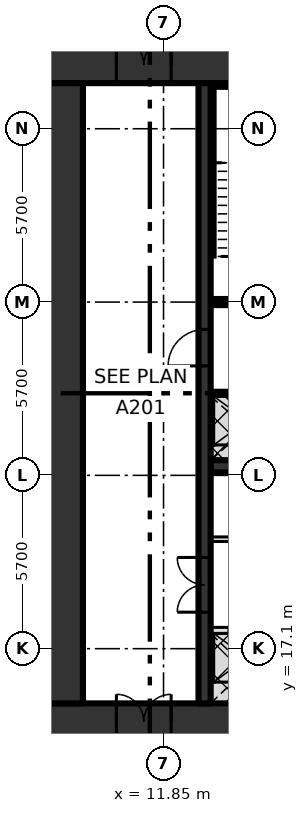
"""IFC4 building model, lengths in metres.
Left out: names, types, materials, properties, quantities, classifications, styles, units other than length and angle.
Written with IfcOpenShell. Run it as: python <this file> out.ifc"""

import sys

from ifc_helpers import new_model, si_unit, direction, frame, frame_2d, origin, place, context, subcontext, project, spatial, rectangle, extrude, element, fill, save


model = new_model("IFC4")
c1 = context("Model", 3, precision=1e-05, world=origin(), true_north=direction((0.0, 1.0)))
c2 = subcontext(c1, "Body", "Model", "MODEL_VIEW")
j1 = project(units=[si_unit("LENGTHUNIT", "METRE"), si_unit("PLANEANGLEUNIT", "RADIAN")], contexts=[c1])
p1 = place(None, origin())
s1 = spatial("IfcSite", under=j1, at=p1, CompositionType="ELEMENT")
p2 = place(p1, origin())
s2 = spatial("IfcBuilding", under=s1, at=p2, CompositionType="ELEMENT")
p3 = place(p2, frame((0.0, 0.0, -9.0)))
s3 = spatial("IfcBuildingStorey", under=s2, at=p3, CompositionType="ELEMENT", Elevation=-9.0)
p4 = place(p3, frame((8.0, 14.7, 0.0), z_axis=(0.0, 0.0, 1.0), x_axis=(1.0, 0.0, 0.0)))
e1 = element("IfcWall", 1, at=p4, inside=s3, PredefinedType="SHEAR", context=c2, shape_type="SweptSolid", body=[
    extrude(rectangle(XDim=22.8, YDim=1.2, at=frame_2d((11.4, 0.0))), origin(), (0.0, 0.0, 1.0), 4.05),
])
p5 = place(p4, frame((2.3, 0.0, 0.0)))
e2 = element("IfcOpeningElement", 2, at=p5, cuts=e1, PredefinedType="OPENING", context=c2, shape_type="SweptSolid", body=[
    extrude(rectangle(XDim=1.8, YDim=2.1, at=frame_2d((0.9, 1.05))), frame((0.0, 0.61, 0.0), z_axis=(0.0, -1.0, 0.0), x_axis=(1.0, 0.0, 0.0)), (0.0, 0.0, 1.0), 1.22),
])
p6 = place(p3, frame((8.0, 36.3, 0.0), z_axis=(0.0, 0.0, 1.0), x_axis=(1.0, 0.0, 0.0)))
e3 = element("IfcWall", 3, at=p6, inside=s3, PredefinedType="SHEAR", context=c2, shape_type="SweptSolid", body=[
    extrude(rectangle(XDim=22.8, YDim=1.2, at=frame_2d((11.4, 0.0))), origin(), (0.0, 0.0, 1.0), 4.05),
])
p7 = place(p6, frame((2.3, 0.0, 0.0)))
e4 = element("IfcOpeningElement", 4, at=p7, cuts=e3, PredefinedType="OPENING", context=c2, shape_type="SweptSolid", body=[
    extrude(rectangle(XDim=1.8, YDim=2.1, at=frame_2d((0.9, 1.05))), frame((0.0, 0.61, 0.0), z_axis=(0.0, -1.0, 0.0), x_axis=(1.0, 0.0, 0.0)), (0.0, 0.0, 1.0), 1.22),
])
p8 = place(p3, frame((8.6, 15.3, 0.0), z_axis=(0.0, 0.0, 1.0), x_axis=(0.0, 1.0, 0.0)))
e5 = element("IfcWall", 5, at=p8, inside=s3, PredefinedType="SHEAR", context=c2, shape_type="SweptSolid", body=[
    extrude(rectangle(XDim=20.4, YDim=1.2, at=frame_2d((10.2, 0.0))), origin(), (0.0, 0.0, 1.0), 4.05),
])
p9 = place(p3, frame((13.4, 17.7, 0.0), z_axis=(0.0, 0.0, 1.0), x_axis=(1.0, 0.0, 0.0)))
e6 = element("IfcWall", 6, at=p9, inside=s3, PredefinedType="SOLIDWALL", context=c2, shape_type="SweptSolid", body=[
    extrude(rectangle(XDim=13.4, YDim=0.2, at=frame_2d((6.7, 0.0))), origin(), (0.0, 0.0, 1.0), 4.05),
])
p10 = place(p9, frame((0.6, 0.0, 0.0)))
e7 = element("IfcOpeningElement", 7, at=p10, cuts=e6, PredefinedType="OPENING", context=c2, shape_type="SweptSolid", body=[
    extrude(rectangle(XDim=1.1, YDim=2.1, at=frame_2d((0.55, 1.05))), frame((0.0, 0.11, 0.0), z_axis=(0.0, -1.0, 0.0), x_axis=(1.0, 0.0, 0.0)), (0.0, 0.0, 1.0), 0.22),
])
p11 = place(p9, frame((3.3, 0.0, 0.0)))
e8 = element("IfcOpeningElement", 8, at=p11, cuts=e6, PredefinedType="OPENING", context=c2, shape_type="SweptSolid", body=[
    extrude(rectangle(XDim=1.1, YDim=2.1, at=frame_2d((0.55, 1.05))), frame((0.0, 0.11, 0.0), z_axis=(0.0, -1.0, 0.0), x_axis=(1.0, 0.0, 0.0)), (0.0, 0.0, 1.0), 0.22),
])
p12 = place(p9, frame((6.0, 0.0, 0.0)))
e9 = element("IfcOpeningElement", 9, at=p12, cuts=e6, PredefinedType="OPENING", context=c2, shape_type="SweptSolid", body=[
    extrude(rectangle(XDim=1.1, YDim=2.1, at=frame_2d((0.55, 1.05))), frame((0.0, 0.11, 0.0), z_axis=(0.0, -1.0, 0.0), x_axis=(1.0, 0.0, 0.0)), (0.0, 0.0, 1.0), 0.22),
])
p13 = place(p9, frame((8.7, 0.0, 0.0)))
e10 = element("IfcOpeningElement", 10, at=p13, cuts=e6, PredefinedType="OPENING", context=c2, shape_type="SweptSolid", body=[
    extrude(rectangle(XDim=1.1, YDim=2.1, at=frame_2d((0.55, 1.05))), frame((0.0, 0.11, 0.0), z_axis=(0.0, -1.0, 0.0), x_axis=(1.0, 0.0, 0.0)), (0.0, 0.0, 1.0), 0.22),
])
p14 = place(p9, frame((11.4, 0.0, 0.0)))
e11 = element("IfcOpeningElement", 11, at=p14, cuts=e6, PredefinedType="OPENING", context=c2, shape_type="SweptSolid", body=[
    extrude(rectangle(XDim=1.1, YDim=2.1, at=frame_2d((0.55, 1.05))), frame((0.0, 0.11, 0.0), z_axis=(0.0, -1.0, 0.0), x_axis=(1.0, 0.0, 0.0)), (0.0, 0.0, 1.0), 0.22),
])
p15 = place(p3, frame((13.4, 20.7, 0.0), z_axis=(0.0, 0.0, 1.0), x_axis=(1.0, 0.0, 0.0)))
e12 = element("IfcWall", 12, at=p15, inside=s3, PredefinedType="PARTITIONING", context=c2, shape_type="SweptSolid", body=[
    extrude(rectangle(XDim=13.375, YDim=0.15, at=frame_2d((6.688, 0.0))), origin(), (0.0, 0.0, 1.0), 4.05),
])
p16 = place(p15, frame((3.4, 0.0, 0.0)))
e13 = element("IfcOpeningElement", 13, at=p16, cuts=e12, PredefinedType="OPENING", context=c2, shape_type="SweptSolid", body=[
    extrude(rectangle(XDim=0.9, YDim=2.1, at=frame_2d((0.45, 1.05))), frame((0.0, 0.085, 0.0), z_axis=(0.0, -1.0, 0.0), x_axis=(1.0, 0.0, 0.0)), (0.0, 0.0, 1.0), 0.17),
])
p17 = place(p15, frame((10.15, 0.0, 0.0)))
e14 = element("IfcOpeningElement", 14, at=p17, cuts=e12, PredefinedType="OPENING", context=c2, shape_type="SweptSolid", body=[
    extrude(rectangle(XDim=0.9, YDim=2.1, at=frame_2d((0.45, 1.05))), frame((0.0, 0.085, 0.0), z_axis=(0.0, -1.0, 0.0), x_axis=(1.0, 0.0, 0.0)), (0.0, 0.0, 1.0), 0.17),
])
p18 = place(p3, frame((13.4, 23.1, 0.0), z_axis=(0.0, 0.0, 1.0), x_axis=(1.0, 0.0, 0.0)))
e15 = element("IfcWall", 15, at=p18, inside=s3, PredefinedType="SHEAR", context=c2, shape_type="SweptSolid", body=[
    extrude(rectangle(XDim=16.2, YDim=0.4, at=frame_2d((8.1, 0.0))), origin(), (0.0, 0.0, 1.0), 4.05),
])
p19 = place(p3, frame((13.4, 25.5, 0.0), z_axis=(0.0, 0.0, 1.0), x_axis=(1.0, 0.0, 0.0)))
e16 = element("IfcWall", 16, at=p19, inside=s3, PredefinedType="SOLIDWALL", context=c2, shape_type="SweptSolid", body=[
    extrude(rectangle(XDim=16.2, YDim=0.2, at=frame_2d((8.1, 0.0))), origin(), (0.0, 0.0, 1.0), 4.05),
])
p20 = place(p19, frame((0.6, 0.0, 0.0)))
e17 = element("IfcOpeningElement", 17, at=p20, cuts=e16, PredefinedType="OPENING", context=c2, shape_type="SweptSolid", body=[
    extrude(rectangle(XDim=1.1, YDim=2.1, at=frame_2d((0.55, 1.05))), frame((0.0, 0.11, 0.0), z_axis=(0.0, -1.0, 0.0), x_axis=(1.0, 0.0, 0.0)), (0.0, 0.0, 1.0), 0.22),
])
p21 = place(p19, frame((3.3, 0.0, 0.0)))
e18 = element("IfcOpeningElement", 18, at=p21, cuts=e16, PredefinedType="OPENING", context=c2, shape_type="SweptSolid", body=[
    extrude(rectangle(XDim=1.1, YDim=2.1, at=frame_2d((0.55, 1.05))), frame((0.0, 0.11, 0.0), z_axis=(0.0, -1.0, 0.0), x_axis=(1.0, 0.0, 0.0)), (0.0, 0.0, 1.0), 0.22),
])
p22 = place(p19, frame((6.0, 0.0, 0.0)))
e19 = element("IfcOpeningElement", 19, at=p22, cuts=e16, PredefinedType="OPENING", context=c2, shape_type="SweptSolid", body=[
    extrude(rectangle(XDim=1.1, YDim=2.1, at=frame_2d((0.55, 1.05))), frame((0.0, 0.11, 0.0), z_axis=(0.0, -1.0, 0.0), x_axis=(1.0, 0.0, 0.0)), (0.0, 0.0, 1.0), 0.22),
])
p23 = place(p19, frame((8.7, 0.0, 0.0)))
e20 = element("IfcOpeningElement", 20, at=p23, cuts=e16, PredefinedType="OPENING", context=c2, shape_type="SweptSolid", body=[
    extrude(rectangle(XDim=1.1, YDim=2.1, at=frame_2d((0.55, 1.05))), frame((0.0, 0.11, 0.0), z_axis=(0.0, -1.0, 0.0), x_axis=(1.0, 0.0, 0.0)), (0.0, 0.0, 1.0), 0.22),
])
p24 = place(p19, frame((12.95, 0.0, 0.0)))
e21 = element("IfcOpeningElement", 21, at=p24, cuts=e16, PredefinedType="OPENING", context=c2, shape_type="SweptSolid", body=[
    extrude(rectangle(XDim=0.9, YDim=2.1, at=frame_2d((0.45, 1.05))), frame((0.0, 0.11, 0.0), z_axis=(0.0, -1.0, 0.0), x_axis=(1.0, 0.0, 0.0)), (0.0, 0.0, 1.0), 0.22),
])
p25 = place(p3, frame((13.4, 28.5, 0.0), z_axis=(0.0, 0.0, 1.0), x_axis=(1.0, 0.0, 0.0)))
e22 = element("IfcWall", 22, at=p25, inside=s3, PredefinedType="SOLIDWALL", context=c2, shape_type="SweptSolid", body=[
    extrude(rectangle(XDim=6.7, YDim=0.2, at=frame_2d((3.35, 0.0))), origin(), (0.0, 0.0, 1.0), 4.05),
])
p26 = place(p25, frame((0.9, 0.0, 0.0)))
e23 = element("IfcOpeningElement", 23, at=p26, cuts=e22, PredefinedType="OPENING", context=c2, shape_type="SweptSolid", body=[
    extrude(rectangle(XDim=1.2, YDim=2.1, at=frame_2d((0.6, 1.05))), frame((0.0, 0.11, 0.0), z_axis=(0.0, -1.0, 0.0), x_axis=(1.0, 0.0, 0.0)), (0.0, 0.0, 1.0), 0.22),
])
p27 = place(p25, frame((3.7, 0.0, 0.0)))
e24 = element("IfcOpeningElement", 24, at=p27, cuts=e22, PredefinedType="OPENING", context=c2, shape_type="SweptSolid", body=[
    extrude(rectangle(XDim=1.1, YDim=2.1, at=frame_2d((0.55, 1.05))), frame((0.0, 0.11, 0.0), z_axis=(0.0, -1.0, 0.0), x_axis=(1.0, 0.0, 0.0)), (0.0, 0.0, 1.0), 0.22),
])
p28 = place(p3, frame((13.2, 15.3, 0.0), z_axis=(0.0, 0.0, 1.0), x_axis=(0.0, 1.0, 0.0)))
e25 = element("IfcWall", 25, at=p28, inside=s3, PredefinedType="SHEAR", context=c2, shape_type="SweptSolid", body=[
    extrude(rectangle(XDim=20.4, YDim=0.4, at=frame_2d((10.2, 0.0))), origin(), (0.0, 0.0, 1.0), 4.05),
])
p29 = place(p28, frame((3.0, 0.0, 0.0)))
e26 = element("IfcOpeningElement", 26, at=p29, cuts=e25, PredefinedType="OPENING", context=c2, shape_type="SweptSolid", body=[
    extrude(rectangle(XDim=1.8, YDim=2.1, at=frame_2d((0.9, 1.05))), frame((0.0, 0.21, 0.0), z_axis=(0.0, -1.0, 0.0), x_axis=(1.0, 0.0, 0.0)), (0.0, 0.0, 1.0), 0.42),
])
p30 = place(p28, frame((11.1, 0.0, 0.0)))
e27 = element("IfcOpeningElement", 27, at=p30, cuts=e25, PredefinedType="OPENING", context=c2, shape_type="SweptSolid", body=[
    extrude(rectangle(XDim=1.2, YDim=2.1, at=frame_2d((0.6, 1.05))), frame((0.0, 0.21, 0.0), z_axis=(0.0, -1.0, 0.0), x_axis=(1.0, 0.0, 0.0)), (0.0, 0.0, 1.0), 0.42),
])
p31 = place(p29, origin())
e28 = element("IfcDoor", 28, at=p31, inside=s3, OperationType="DOUBLE_DOOR_SINGLE_SWING", PredefinedType="DOOR", context=c2, shape_type="SweptSolid", body=[
    extrude(rectangle(XDim=1.8, YDim=2.1, at=frame_2d((0.9, 1.05))), frame((0.0, 0.025, 0.0), z_axis=(0.0, -1.0, 0.0), x_axis=(1.0, 0.0, 0.0)), (0.0, 0.0, 1.0), 0.05),
])
fill(e26, e28)
p32 = place(p30, origin())
e29 = element("IfcDoor", 29, at=p32, inside=s3, OperationType="SINGLE_SWING_LEFT", PredefinedType="DOOR", context=c2, shape_type="SweptSolid", body=[
    extrude(rectangle(XDim=1.2, YDim=2.1, at=frame_2d((0.6, 1.05))), frame((0.0, 0.025, 0.0), z_axis=(0.0, -1.0, 0.0), x_axis=(1.0, 0.0, 0.0)), (0.0, 0.0, 1.0), 0.05),
])
fill(e27, e29)
p33 = place(p7, origin())
e30 = element("IfcDoor", 30, at=p33, inside=s3, OperationType="DOUBLE_DOOR_SINGLE_SWING", PredefinedType="DOOR", context=c2, shape_type="SweptSolid", body=[
    extrude(rectangle(XDim=1.8, YDim=2.1, at=frame_2d((0.9, 1.05))), frame((0.0, 0.025, 0.0), z_axis=(0.0, -1.0, 0.0), x_axis=(1.0, 0.0, 0.0)), (0.0, 0.0, 1.0), 0.05),
])
fill(e4, e30)
p34 = place(p5, origin())
e31 = element("IfcDoor", 31, at=p34, inside=s3, OperationType="DOUBLE_DOOR_SINGLE_SWING", PredefinedType="DOOR", context=c2, shape_type="SweptSolid", body=[
    extrude(rectangle(XDim=1.8, YDim=2.1, at=frame_2d((0.9, 1.05))), frame((0.0, 0.025, 0.0), z_axis=(0.0, -1.0, 0.0), x_axis=(1.0, 0.0, 0.0)), (0.0, 0.0, 1.0), 0.05),
])
fill(e2, e31)
save(model, sys.argv[1])
